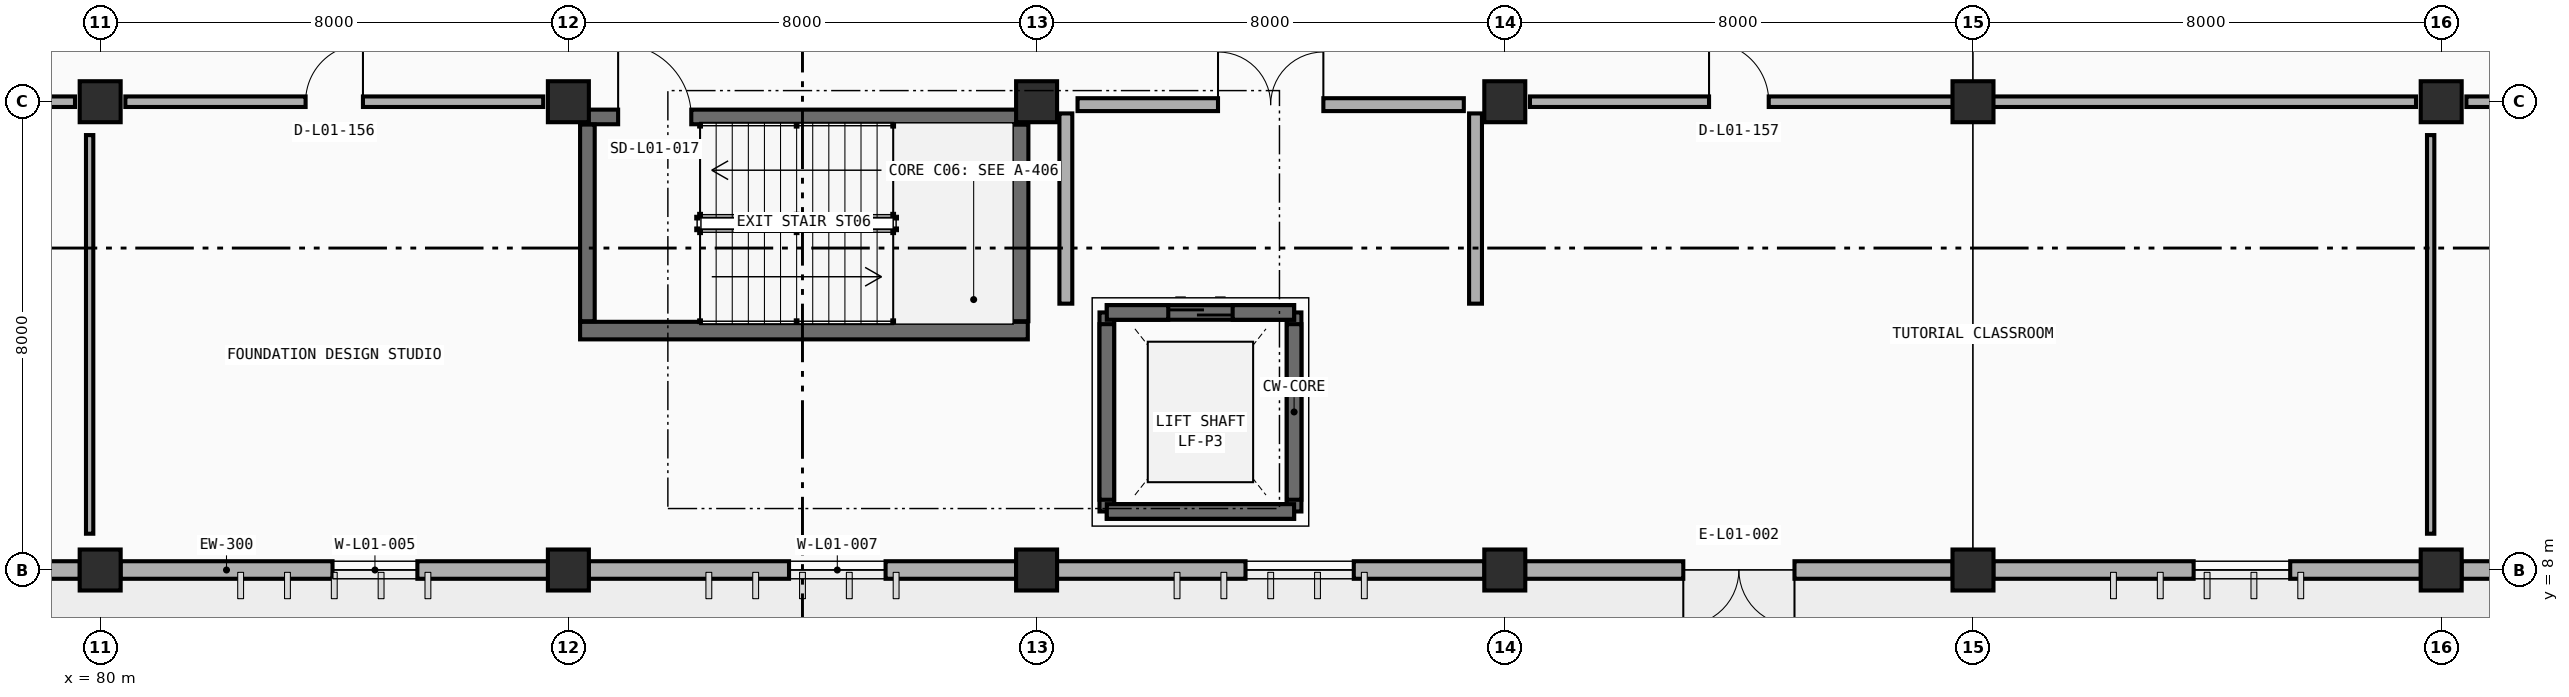
"""IFC4 building model, lengths in metres.
Left out: names, types, materials, properties, quantities, classifications, styles, units other than length and angle.
Written with IfcOpenShell. Run it as: python <this file> out.ifc"""

import sys

from ifc_helpers import new_model, si_unit, direction, frame, frame_2d, origin, origin_2d, place, context, subcontext, project, spatial, rectangle, extrude, element, fill, save


model = new_model("IFC4")
c1 = context("Model", 3, precision=1e-05, world=origin(), true_north=direction((0.0, 1.0)))
c2 = subcontext(c1, "Body", "Model", "MODEL_VIEW")
j1 = project(units=[si_unit("LENGTHUNIT", "METRE"), si_unit("PLANEANGLEUNIT", "RADIAN")], contexts=[c1])
p1 = place(None, origin())
s1 = spatial("IfcSite", under=j1, at=p1, CompositionType="ELEMENT")
p2 = place(p1, origin())
s2 = spatial("IfcBuilding", under=s1, at=p2, CompositionType="ELEMENT")
p3 = place(p2, origin())
s3 = spatial("IfcBuildingStorey", under=s2, at=p3, CompositionType="ELEMENT", Elevation=0.0)
for number, where, z_axis, x_axis in (
    (1, (80.0, 8.0, 0.0), (0.0, 0.0, 1.0), (1.0, 0.0, 0.0)),
    (2, (88.0, 8.0, 0.0), (0.0, 0.0, 1.0), (1.0, 0.0, 0.0)),
    (3, (96.0, 8.0, 0.0), (0.0, 0.0, 1.0), (1.0, 0.0, 0.0)),
    (4, (104.0, 8.0, 0.0), (0.0, 0.0, 1.0), (1.0, 0.0, 0.0)),
    (5, (112.0, 8.0, 0.0), (0.0, 0.0, 1.0), (1.0, 0.0, 0.0)),
    (6, (120.0, 8.0, 0.0), (0.0, 0.0, 1.0), (1.0, 0.0, 0.0)),
    (7, (80.0, 16.0, 0.0), (0.0, 0.0, 1.0), (1.0, 0.0, 0.0)),
    (8, (88.0, 16.0, 0.0), (0.0, 0.0, 1.0), (1.0, 0.0, 0.0)),
    (9, (96.0, 16.0, 0.0), (0.0, 0.0, 1.0), (1.0, 0.0, 0.0)),
    (10, (104.0, 16.0, 0.0), (0.0, 0.0, 1.0), (1.0, 0.0, 0.0)),
    (11, (112.0, 16.0, 0.0), (0.0, 0.0, 1.0), (1.0, 0.0, 0.0)),
    (12, (120.0, 16.0, 0.0), (0.0, 0.0, 1.0), (1.0, 0.0, 0.0)),
):
    element("IfcColumn", number, at=place(p3, frame(where, z_axis=z_axis, x_axis=x_axis)), inside=s3, PredefinedType="COLUMN", context=c2, shape_type="SweptSolid", body=[
        extrude(rectangle(XDim=0.7, YDim=0.7, at=origin_2d()), origin(), (0.0, 0.0, 1.0), 4.8),
    ])
p4 = place(p3, frame((79.653, 8.0, 0.0), z_axis=(0.0, 0.0, 1.0), x_axis=(-1.0, 0.0, 0.0)))
e13 = element("IfcWall", 13, at=p4, inside=s3, PredefinedType="STANDARD", context=c2, shape_type="SweptSolid", body=[
    extrude(rectangle(XDim=7.306, YDim=0.3, at=frame_2d((3.653, 0.0))), origin(), (0.0, 0.0, 1.0), 3.91),
])
p5 = place(p4, frame((2.233, 0.0, 0.9)))
e14 = element("IfcOpeningElement", 14, at=p5, cuts=e13, PredefinedType="OPENING", context=c2, shape_type="SweptSolid", body=[
    extrude(rectangle(XDim=1.85, YDim=1.25, at=frame_2d((0.925, 0.625))), frame((0.0, 0.16, 0.0), z_axis=(0.0, -1.0, 0.0), x_axis=(1.0, 0.0, 0.0)), (0.0, 0.0, 1.0), 0.32),
])
p6 = place(p3, frame((87.653, 8.0, 0.0), z_axis=(0.0, 0.0, 1.0), x_axis=(-1.0, 0.0, 0.0)))
e15 = element("IfcWall", 15, at=p6, inside=s3, PredefinedType="STANDARD", context=c2, shape_type="SweptSolid", body=[
    extrude(rectangle(XDim=7.306, YDim=0.3, at=frame_2d((3.653, 0.0))), origin(), (0.0, 0.0, 1.0), 3.91),
])
p7 = place(p6, frame((2.233, 0.0, 0.9)))
e16 = element("IfcOpeningElement", 16, at=p7, cuts=e15, PredefinedType="OPENING", context=c2, shape_type="SweptSolid", body=[
    extrude(rectangle(XDim=1.45, YDim=1.25, at=frame_2d((0.725, 0.625))), frame((0.0, 0.16, 0.0), z_axis=(0.0, -1.0, 0.0), x_axis=(1.0, 0.0, 0.0)), (0.0, 0.0, 1.0), 0.32),
])
p8 = place(p3, frame((95.653, 8.0, 0.0), z_axis=(0.0, 0.0, 1.0), x_axis=(-1.0, 0.0, 0.0)))
e17 = element("IfcWall", 17, at=p8, inside=s3, PredefinedType="STANDARD", context=c2, shape_type="SweptSolid", body=[
    extrude(rectangle(XDim=7.306, YDim=0.3, at=frame_2d((3.653, 0.0))), origin(), (0.0, 0.0, 1.0), 3.91),
])
p9 = place(p8, frame((2.233, 0.0, 0.9)))
e18 = element("IfcOpeningElement", 18, at=p9, cuts=e17, PredefinedType="OPENING", context=c2, shape_type="SweptSolid", body=[
    extrude(rectangle(XDim=1.65, YDim=1.25, at=frame_2d((0.825, 0.625))), frame((0.0, 0.16, 0.0), z_axis=(0.0, -1.0, 0.0), x_axis=(1.0, 0.0, 0.0)), (0.0, 0.0, 1.0), 0.32),
])
p10 = place(p3, frame((103.653, 8.0, 0.0), z_axis=(0.0, 0.0, 1.0), x_axis=(-1.0, 0.0, 0.0)))
e19 = element("IfcWall", 19, at=p10, inside=s3, PredefinedType="STANDARD", context=c2, shape_type="SweptSolid", body=[
    extrude(rectangle(XDim=7.306, YDim=0.3, at=frame_2d((3.653, 0.0))), origin(), (0.0, 0.0, 1.0), 3.91),
])
p11 = place(p10, frame((2.233, 0.0, 0.9)))
e20 = element("IfcOpeningElement", 20, at=p11, cuts=e19, PredefinedType="OPENING", context=c2, shape_type="SweptSolid", body=[
    extrude(rectangle(XDim=1.85, YDim=1.25, at=frame_2d((0.925, 0.625))), frame((0.0, 0.16, 0.0), z_axis=(0.0, -1.0, 0.0), x_axis=(1.0, 0.0, 0.0)), (0.0, 0.0, 1.0), 0.32),
])
p12 = place(p3, frame((111.653, 8.0, 0.0), z_axis=(0.0, 0.0, 1.0), x_axis=(-1.0, 0.0, 0.0)))
e21 = element("IfcWall", 21, at=p12, inside=s3, PredefinedType="STANDARD", context=c2, shape_type="SweptSolid", body=[
    extrude(rectangle(XDim=7.306, YDim=0.3, at=frame_2d((3.653, 0.0))), origin(), (0.0, 0.0, 1.0), 3.91),
])
p13 = place(p12, frame((2.703, 0.0, 0.0)))
e22 = element("IfcOpeningElement", 22, at=p13, cuts=e21, PredefinedType="OPENING", context=c2, shape_type="SweptSolid", body=[
    extrude(rectangle(XDim=1.9, YDim=2.3, at=frame_2d((0.95, 1.15))), frame((0.0, 0.16, 0.0), z_axis=(0.0, -1.0, 0.0), x_axis=(1.0, 0.0, 0.0)), (0.0, 0.0, 1.0), 0.32),
])
p14 = place(p3, frame((119.653, 8.0, 0.0), z_axis=(0.0, 0.0, 1.0), x_axis=(-1.0, 0.0, 0.0)))
e23 = element("IfcWall", 23, at=p14, inside=s3, PredefinedType="STANDARD", context=c2, shape_type="SweptSolid", body=[
    extrude(rectangle(XDim=7.306, YDim=0.3, at=frame_2d((3.653, 0.0))), origin(), (0.0, 0.0, 1.0), 3.91),
])
p15 = place(p14, frame((2.233, 0.0, 0.9)))
e24 = element("IfcOpeningElement", 24, at=p15, cuts=e23, PredefinedType="OPENING", context=c2, shape_type="SweptSolid", body=[
    extrude(rectangle(XDim=1.65, YDim=1.25, at=frame_2d((0.825, 0.625))), frame((0.0, 0.16, 0.0), z_axis=(0.0, -1.0, 0.0), x_axis=(1.0, 0.0, 0.0)), (0.0, 0.0, 1.0), 0.32),
])
p16 = place(p3, frame((127.653, 8.0, 0.0), z_axis=(0.0, 0.0, 1.0), x_axis=(-1.0, 0.0, 0.0)))
e25 = element("IfcWall", 25, at=p16, inside=s3, PredefinedType="STANDARD", context=c2, shape_type="SweptSolid", body=[
    extrude(rectangle(XDim=7.306, YDim=0.3, at=frame_2d((3.653, 0.0))), origin(), (0.0, 0.0, 1.0), 3.91),
])
p17 = place(p16, frame((2.233, 0.0, 0.9)))
e26 = element("IfcOpeningElement", 26, at=p17, cuts=e25, PredefinedType="OPENING", context=c2, shape_type="SweptSolid", body=[
    extrude(rectangle(XDim=1.85, YDim=1.25, at=frame_2d((0.925, 0.625))), frame((0.0, 0.16, 0.0), z_axis=(0.0, -1.0, 0.0), x_axis=(1.0, 0.0, 0.0)), (0.0, 0.0, 1.0), 0.32),
])
p18 = place(p3, frame((88.2, 12.09, 0.0), z_axis=(0.0, 0.0, 1.0), x_axis=(1.0, 0.0, 0.0)))
e27 = element("IfcWall", 27, at=p18, inside=s3, PredefinedType="SHEAR", context=c2, shape_type="SweptSolid", body=[
    extrude(rectangle(XDim=7.65, YDim=0.3, at=frame_2d((3.825, 0.0))), origin(), (0.0, 0.0, 1.0), 4.8),
])
p19 = place(p3, frame((95.71, 12.25, 0.0), z_axis=(0.0, 0.0, 1.0), x_axis=(0.0, 1.0, 0.0)))
e28 = element("IfcWall", 28, at=p19, inside=s3, PredefinedType="SHEAR", context=c2, shape_type="SweptSolid", body=[
    extrude(rectangle(XDim=3.36, YDim=0.3, at=frame_2d((1.68, 0.0))), origin(), (0.0, 0.0, 1.0), 4.8),
])
p20 = place(p3, frame((88.2, 15.74, 0.0), z_axis=(0.0, 0.0, 1.0), x_axis=(1.0, 0.0, 0.0)))
e29 = element("IfcWall", 29, at=p20, inside=s3, PredefinedType="SOLIDWALL", context=c2, shape_type="SweptSolid", body=[
    extrude(rectangle(XDim=7.65, YDim=0.25, at=frame_2d((3.825, 0.0))), origin(), (0.0, 0.0, 1.0), 4.8),
])
p21 = place(p20, frame((0.65, 0.0, 0.0)))
e30 = element("IfcOpeningElement", 30, at=p21, cuts=e29, PredefinedType="OPENING", context=c2, shape_type="SweptSolid", body=[
    extrude(rectangle(XDim=1.25, YDim=2.15, at=frame_2d((0.625, 1.075))), frame((0.0, 0.135, 0.0), z_axis=(0.0, -1.0, 0.0), x_axis=(1.0, 0.0, 0.0)), (0.0, 0.0, 1.0), 0.27),
])
p22 = place(p3, frame((88.325, 12.25, 0.0), z_axis=(0.0, 0.0, 1.0), x_axis=(0.0, 1.0, 0.0)))
e31 = element("IfcWall", 31, at=p22, inside=s3, PredefinedType="SOLIDWALL", context=c2, shape_type="SweptSolid", body=[
    extrude(rectangle(XDim=3.36, YDim=0.25, at=frame_2d((1.68, 0.0))), origin(), (0.0, 0.0, 1.0), 4.8),
])
p23 = place(p3, frame((97.2, 9.0, -1.5), z_axis=(0.0, 0.0, 1.0), x_axis=(1.0, 0.0, 0.0)))
e32 = element("IfcWall", 32, at=p23, inside=s3, PredefinedType="SOLIDWALL", context=c2, shape_type="SweptSolid", body=[
    extrude(rectangle(XDim=3.2, YDim=0.25, at=frame_2d((1.6, 0.0))), origin(), (0.0, 0.0, 1.0), 1.5),
])
p24 = place(p3, frame((100.4, 9.0, -1.5), z_axis=(0.0, 0.0, 1.0), x_axis=(0.0, 1.0, 0.0)))
e33 = element("IfcWall", 33, at=p24, inside=s3, PredefinedType="SOLIDWALL", context=c2, shape_type="SweptSolid", body=[
    extrude(rectangle(XDim=3.4, YDim=0.25, at=frame_2d((1.7, 0.0))), origin(), (0.0, 0.0, 1.0), 1.5),
])
p25 = place(p3, frame((100.4, 12.4, -1.5), z_axis=(0.0, 0.0, 1.0), x_axis=(-1.0, 0.0, 0.0)))
e34 = element("IfcWall", 34, at=p25, inside=s3, PredefinedType="SOLIDWALL", context=c2, shape_type="SweptSolid", body=[
    extrude(rectangle(XDim=3.2, YDim=0.25, at=frame_2d((1.6, 0.0))), origin(), (0.0, 0.0, 1.0), 1.5),
])
p26 = place(p3, frame((97.2, 12.4, -1.5), z_axis=(0.0, 0.0, 1.0), x_axis=(0.0, -1.0, 0.0)))
e35 = element("IfcWall", 35, at=p26, inside=s3, PredefinedType="SOLIDWALL", context=c2, shape_type="SweptSolid", body=[
    extrude(rectangle(XDim=3.4, YDim=0.25, at=frame_2d((1.7, 0.0))), origin(), (0.0, 0.0, 1.0), 1.5),
])
p27 = place(p3, frame((97.2, 9.0, 0.0), z_axis=(0.0, 0.0, 1.0), x_axis=(1.0, 0.0, 0.0)))
e36 = element("IfcWall", 36, at=p27, inside=s3, PredefinedType="SOLIDWALL", context=c2, shape_type="SweptSolid", body=[
    extrude(rectangle(XDim=3.2, YDim=0.25, at=frame_2d((1.6, 0.0))), origin(), (0.0, 0.0, 1.0), 4.8),
])
p28 = place(p3, frame((97.2, 12.4, 0.0), z_axis=(0.0, 0.0, 1.0), x_axis=(1.0, 0.0, 0.0)))
e37 = element("IfcWall", 37, at=p28, inside=s3, PredefinedType="SOLIDWALL", context=c2, shape_type="SweptSolid", body=[
    extrude(rectangle(XDim=3.2, YDim=0.25, at=frame_2d((1.6, 0.0))), origin(), (0.0, 0.0, 1.0), 4.8),
])
p29 = place(p28, frame((1.05, 0.0, 0.0)))
e38 = element("IfcOpeningElement", 38, at=p29, cuts=e37, PredefinedType="OPENING", context=c2, shape_type="SweptSolid", body=[
    extrude(rectangle(XDim=1.1, YDim=2.15, at=frame_2d((0.55, 1.075))), frame((0.0, 0.135, 0.0), z_axis=(0.0, -1.0, 0.0), x_axis=(1.0, 0.0, 0.0)), (0.0, 0.0, 1.0), 0.27),
])
for number, where, z_axis, x_axis in (
    (39, (97.2, 9.2, 0.0), (0.0, 0.0, 1.0), (0.0, 1.0, 0.0)),
    (40, (100.4, 9.2, 0.0), (0.0, 0.0, 1.0), (0.0, 1.0, 0.0)),
):
    element("IfcWall", number, at=place(p3, frame(where, z_axis=z_axis, x_axis=x_axis)), inside=s3, PredefinedType="SOLIDWALL", context=c2, shape_type="SweptSolid", body=[
        extrude(rectangle(XDim=3.0, YDim=0.25, at=frame_2d((1.5, 0.0))), origin(), (0.0, 0.0, 1.0), 4.8),
    ])
p30 = place(p3, frame((96.7, 15.95, 0.0), z_axis=(0.0, 0.0, 1.0), x_axis=(1.0, 0.0, 0.0)))
e41 = element("IfcWall", 41, at=p30, inside=s3, PredefinedType="PARTITIONING", context=c2, shape_type="SweptSolid", body=[
    extrude(rectangle(XDim=6.6, YDim=0.22, at=frame_2d((3.3, 0.0))), origin(), (0.0, 0.0, 1.0), 3.81),
])
p31 = place(p30, frame((2.4, 0.0, 0.0)))
e42 = element("IfcOpeningElement", 42, at=p31, cuts=e41, PredefinedType="OPENING", context=c2, shape_type="SweptSolid", body=[
    extrude(rectangle(XDim=1.8, YDim=2.2, at=frame_2d((0.9, 1.1))), frame((0.0, 0.12, 0.0), z_axis=(0.0, -1.0, 0.0), x_axis=(1.0, 0.0, 0.0)), (0.0, 0.0, 1.0), 0.24),
])
for number, where, z_axis, x_axis in (
    (43, (96.5, 12.55, 0.0), (0.0, 0.0, 1.0), (0.0, 1.0, 0.0)),
    (44, (103.5, 12.55, 0.0), (0.0, 0.0, 1.0), (0.0, 1.0, 0.0)),
):
    element("IfcWall", number, at=place(p3, frame(where, z_axis=z_axis, x_axis=x_axis)), inside=s3, PredefinedType="PARTITIONING", context=c2, shape_type="SweptSolid", body=[
        extrude(rectangle(XDim=3.25, YDim=0.22, at=frame_2d((1.625, 0.0))), origin(), (0.0, 0.0, 1.0), 3.76),
    ])
p32 = place(p3, frame((72.43, 16.0, 0.0), z_axis=(0.0, 0.0, 1.0), x_axis=(1.0, 0.0, 0.0)))
e45 = element("IfcWall", 45, at=p32, inside=s3, PredefinedType="PARTITIONING", context=c2, shape_type="SweptSolid", body=[
    extrude(rectangle(XDim=7.14, YDim=0.18, at=frame_2d((3.57, 0.0))), origin(), (0.0, 0.0, 1.0), 3.81),
])
p33 = place(p32, frame((3.12, 0.0, 0.0)))
e46 = element("IfcOpeningElement", 46, at=p33, cuts=e45, PredefinedType="OPENING", context=c2, shape_type="SweptSolid", body=[
    extrude(rectangle(XDim=0.9, YDim=2.1, at=frame_2d((0.45, 1.05))), frame((0.0, 0.1, 0.0), z_axis=(0.0, -1.0, 0.0), x_axis=(1.0, 0.0, 0.0)), (0.0, 0.0, 1.0), 0.2),
])
p34 = place(p3, frame((79.82, 8.62, 0.0), z_axis=(0.0, 0.0, 1.0), x_axis=(0.0, 1.0, 0.0)))
e47 = element("IfcWall", 47, at=p34, inside=s3, PredefinedType="PARTITIONING", context=c2, shape_type="SweptSolid", body=[
    extrude(rectangle(XDim=6.81, YDim=0.125, at=frame_2d((3.405, 0.0))), origin(), (0.0, 0.0, 1.0), 3.76),
])
p35 = place(p3, frame((80.43, 16.0, 0.0), z_axis=(0.0, 0.0, 1.0), x_axis=(1.0, 0.0, 0.0)))
e48 = element("IfcWall", 48, at=p35, inside=s3, PredefinedType="PARTITIONING", context=c2, shape_type="SweptSolid", body=[
    extrude(rectangle(XDim=7.14, YDim=0.18, at=frame_2d((3.57, 0.0))), origin(), (0.0, 0.0, 1.0), 3.81),
])
p36 = place(p35, frame((3.08, 0.0, 0.0)))
e49 = element("IfcOpeningElement", 49, at=p36, cuts=e48, PredefinedType="OPENING", context=c2, shape_type="SweptSolid", body=[
    extrude(rectangle(XDim=0.98, YDim=2.1, at=frame_2d((0.49, 1.05))), frame((0.0, 0.1, 0.0), z_axis=(0.0, -1.0, 0.0), x_axis=(1.0, 0.0, 0.0)), (0.0, 0.0, 1.0), 0.2),
])
p37 = place(p3, frame((104.43, 16.0, 0.0), z_axis=(0.0, 0.0, 1.0), x_axis=(1.0, 0.0, 0.0)))
e50 = element("IfcWall", 50, at=p37, inside=s3, PredefinedType="PARTITIONING", context=c2, shape_type="SweptSolid", body=[
    extrude(rectangle(XDim=15.14, YDim=0.18, at=frame_2d((7.57, 0.0))), origin(), (0.0, 0.0, 1.0), 3.81),
])
p38 = place(p37, frame((3.06, 0.0, 0.0)))
e51 = element("IfcOpeningElement", 51, at=p38, cuts=e50, PredefinedType="OPENING", context=c2, shape_type="SweptSolid", body=[
    extrude(rectangle(XDim=1.02, YDim=2.1, at=frame_2d((0.51, 1.05))), frame((0.0, 0.1, 0.0), z_axis=(0.0, -1.0, 0.0), x_axis=(1.0, 0.0, 0.0)), (0.0, 0.0, 1.0), 0.2),
])
p39 = place(p3, frame((119.82, 8.62, 0.0), z_axis=(0.0, 0.0, 1.0), x_axis=(0.0, 1.0, 0.0)))
e52 = element("IfcWall", 52, at=p39, inside=s3, PredefinedType="PARTITIONING", context=c2, shape_type="SweptSolid", body=[
    extrude(rectangle(XDim=6.81, YDim=0.125, at=frame_2d((3.405, 0.0))), origin(), (0.0, 0.0, 1.0), 3.76),
])
p40 = place(p3, frame((120.43, 16.0, 0.0), z_axis=(0.0, 0.0, 1.0), x_axis=(1.0, 0.0, 0.0)))
e53 = element("IfcWall", 53, at=p40, inside=s3, PredefinedType="PARTITIONING", context=c2, shape_type="SweptSolid", body=[
    extrude(rectangle(XDim=23.14, YDim=0.18, at=frame_2d((11.57, 0.0))), origin(), (0.0, 0.0, 1.0), 3.81),
])
p41 = place(p40, frame((2.8, 0.0, 0.0)))
e54 = element("IfcOpeningElement", 54, at=p41, cuts=e53, PredefinedType="OPENING", context=c2, shape_type="SweptSolid", body=[
    extrude(rectangle(XDim=1.54, YDim=2.2, at=frame_2d((0.77, 1.1))), frame((0.0, 0.1, 0.0), z_axis=(0.0, -1.0, 0.0), x_axis=(1.0, 0.0, 0.0)), (0.0, 0.0, 1.0), 0.2),
])
p42 = place(p7, origin())
e55 = element("IfcWindow", 55, at=p42, inside=s3, PartitioningType="SINGLE_PANEL", PredefinedType="WINDOW", context=c2, shape_type="SweptSolid", body=[
    extrude(rectangle(XDim=1.45, YDim=1.25, at=frame_2d((0.725, 0.625))), frame((0.0, 0.03, 0.0), z_axis=(0.0, -1.0, 0.0), x_axis=(1.0, 0.0, 0.0)), (0.0, 0.0, 1.0), 0.06),
])
fill(e16, e55)
p43 = place(p9, origin())
e56 = element("IfcWindow", 56, at=p43, inside=s3, PartitioningType="DOUBLE_PANEL_VERTICAL", PredefinedType="WINDOW", context=c2, shape_type="SweptSolid", body=[
    extrude(rectangle(XDim=1.65, YDim=1.25, at=frame_2d((0.825, 0.625))), frame((0.0, 0.03, 0.0), z_axis=(0.0, -1.0, 0.0), x_axis=(1.0, 0.0, 0.0)), (0.0, 0.0, 1.0), 0.06),
])
fill(e18, e56)
p44 = place(p11, origin())
e57 = element("IfcWindow", 57, at=p44, inside=s3, PartitioningType="DOUBLE_PANEL_VERTICAL", PredefinedType="WINDOW", context=c2, shape_type="SweptSolid", body=[
    extrude(rectangle(XDim=1.85, YDim=1.25, at=frame_2d((0.925, 0.625))), frame((0.0, 0.03, 0.0), z_axis=(0.0, -1.0, 0.0), x_axis=(1.0, 0.0, 0.0)), (0.0, 0.0, 1.0), 0.06),
])
fill(e20, e57)
p45 = place(p13, origin())
e58 = element("IfcDoor", 58, at=p45, inside=s3, OperationType="DOUBLE_DOOR_SINGLE_SWING", PredefinedType="DOOR", context=c2, shape_type="SweptSolid", body=[
    extrude(rectangle(XDim=1.9, YDim=2.3, at=frame_2d((0.95, 1.15))), frame((0.0, 0.025, 0.0), z_axis=(0.0, -1.0, 0.0), x_axis=(1.0, 0.0, 0.0)), (0.0, 0.0, 1.0), 0.05),
])
fill(e22, e58)
p46 = place(p15, origin())
e59 = element("IfcWindow", 59, at=p46, inside=s3, PartitioningType="DOUBLE_PANEL_VERTICAL", PredefinedType="WINDOW", context=c2, shape_type="SweptSolid", body=[
    extrude(rectangle(XDim=1.65, YDim=1.25, at=frame_2d((0.825, 0.625))), frame((0.0, 0.03, 0.0), z_axis=(0.0, -1.0, 0.0), x_axis=(1.0, 0.0, 0.0)), (0.0, 0.0, 1.0), 0.06),
])
fill(e24, e59)
p47 = place(p21, origin())
e60 = element("IfcDoor", 60, at=p47, inside=s3, OperationType="SINGLE_SWING_LEFT", PredefinedType="DOOR", context=c2, shape_type="SweptSolid", body=[
    extrude(rectangle(XDim=1.25, YDim=2.15, at=frame_2d((0.625, 1.075))), frame((0.0, 0.025, 0.0), z_axis=(0.0, -1.0, 0.0), x_axis=(1.0, 0.0, 0.0)), (0.0, 0.0, 1.0), 0.05),
])
fill(e30, e60)
p48 = place(p29, origin())
e61 = element("IfcDoor", 61, at=p48, inside=s3, OperationType="DOUBLE_DOOR_SLIDING", PredefinedType="DOOR", context=c2, shape_type="SweptSolid", body=[
    extrude(rectangle(XDim=1.1, YDim=2.15, at=frame_2d((0.55, 1.075))), frame((0.0, 0.025, 0.0), z_axis=(0.0, -1.0, 0.0), x_axis=(1.0, 0.0, 0.0)), (0.0, 0.0, 1.0), 0.05),
])
fill(e38, e61)
p49 = place(p31, origin())
e62 = element("IfcDoor", 62, at=p49, inside=s3, OperationType="DOUBLE_DOOR_SINGLE_SWING", PredefinedType="DOOR", context=c2, shape_type="SweptSolid", body=[
    extrude(rectangle(XDim=1.8, YDim=2.2, at=frame_2d((0.9, 1.1))), frame((0.0, 0.025, 0.0), z_axis=(0.0, -1.0, 0.0), x_axis=(1.0, 0.0, 0.0)), (0.0, 0.0, 1.0), 0.05),
])
fill(e42, e62)
p50 = place(p36, origin())
e63 = element("IfcDoor", 63, at=p50, inside=s3, OperationType="SINGLE_SWING_RIGHT", PredefinedType="DOOR", context=c2, shape_type="SweptSolid", body=[
    extrude(rectangle(XDim=0.98, YDim=2.1, at=frame_2d((0.49, 1.05))), frame((0.0, 0.025, 0.0), z_axis=(0.0, -1.0, 0.0), x_axis=(1.0, 0.0, 0.0)), (0.0, 0.0, 1.0), 0.05),
])
fill(e49, e63)
p51 = place(p38, origin())
e64 = element("IfcDoor", 64, at=p51, inside=s3, OperationType="SINGLE_SWING_LEFT", PredefinedType="DOOR", context=c2, shape_type="SweptSolid", body=[
    extrude(rectangle(XDim=1.02, YDim=2.1, at=frame_2d((0.51, 1.05))), frame((0.0, 0.025, 0.0), z_axis=(0.0, -1.0, 0.0), x_axis=(1.0, 0.0, 0.0)), (0.0, 0.0, 1.0), 0.05),
])
fill(e51, e64)
save(model, sys.argv[1])
